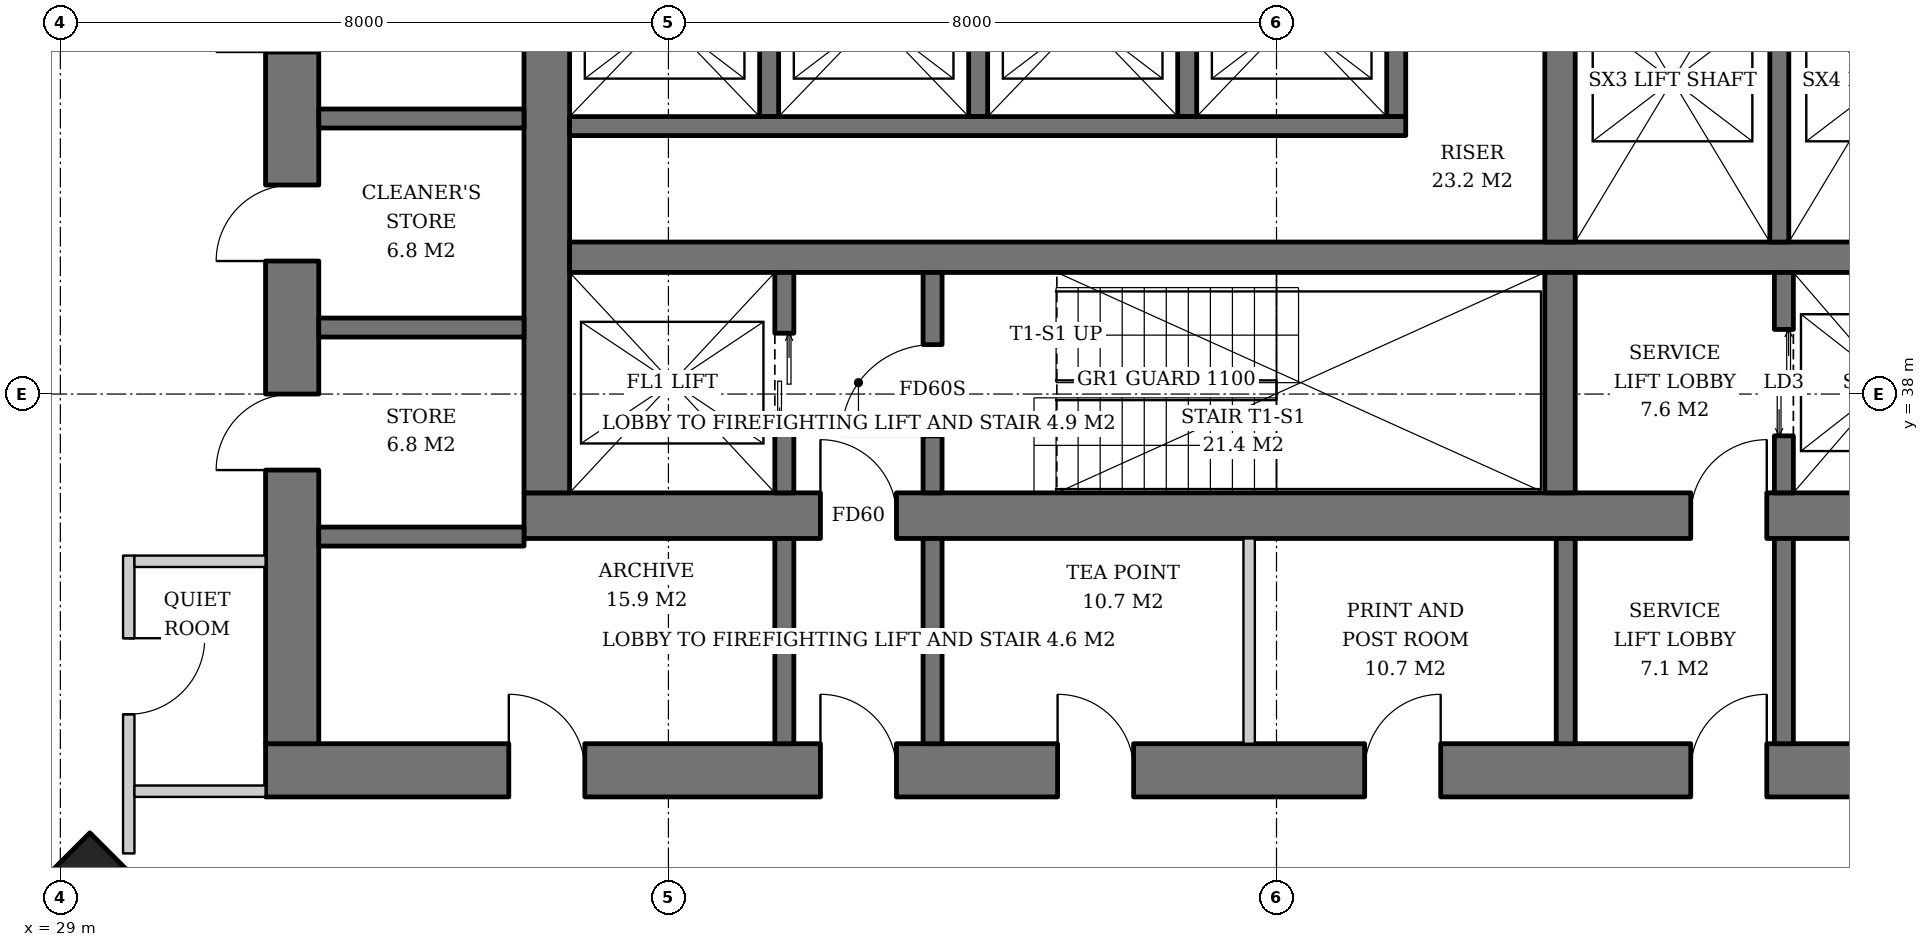
"""IFC4 building model, lengths in metres.
Left out: names, types, materials, properties, quantities, classifications, styles, units other than length and angle.
Written with IfcOpenShell. Run it as: python <this file> out.ifc"""

import sys

from ifc_helpers import new_model, si_unit, direction, frame, frame_2d, origin, origin_2d, place, context, subcontext, project, spatial, rectangle, extrude, element, fill, save


model = new_model("IFC4")
c1 = context("Model", 3, precision=1e-05, world=origin(), true_north=direction((0.0, 1.0)))
c2 = subcontext(c1, "Body", "Model", "MODEL_VIEW")
j1 = project(units=[si_unit("LENGTHUNIT", "METRE"), si_unit("PLANEANGLEUNIT", "RADIAN")], contexts=[c1])
p1 = place(None, origin())
s1 = spatial("IfcSite", under=j1, at=p1, CompositionType="ELEMENT")
p2 = place(p1, origin())
s2 = spatial("IfcBuilding", under=s1, at=p2, CompositionType="ELEMENT")
p3 = place(p2, frame((0.0, 0.0, 154.0)))
s3 = spatial("IfcBuildingStorey", under=s2, at=p3, CompositionType="ELEMENT", Elevation=154.0)
p4 = place(p3, frame((29.35, 30.35, 0.0), z_axis=(0.031898107953, 0.031898107953, 0.998981992539), x_axis=(-0.707106781187, 0.707106781187, 0.0)))
e1 = element("IfcColumn", 1, at=p4, inside=s3, PredefinedType="COLUMN", context=c2, shape_type="SweptSolid", body=[
    extrude(rectangle(XDim=2.6, YDim=2.6, at=origin_2d()), origin(), (0.0, 0.0, 1.0), 3.804),
])
p5 = place(p3, frame((35.1, 36.4, 0.0), z_axis=(0.0, 0.0, 1.0), x_axis=(1.0, 0.0, 0.0)))
e2 = element("IfcWall", 2, at=p5, inside=s3, PredefinedType="SHEAR", context=c2, shape_type="SweptSolid", body=[
    extrude(rectangle(XDim=19.8, YDim=0.6, at=frame_2d((9.9, 0.0))), origin(), (0.0, 0.0, 1.0), 3.8),
])
p6 = place(p5, frame((3.9, 0.0, 0.0)))
e3 = element("IfcOpeningElement", 3, at=p6, cuts=e2, PredefinedType="OPENING", context=c2, shape_type="SweptSolid", body=[
    extrude(rectangle(XDim=1.0, YDim=2.1, at=frame_2d((0.5, 1.05))), frame((0.0, 0.31, 0.0), z_axis=(0.0, -1.0, 0.0), x_axis=(1.0, 0.0, 0.0)), (0.0, 0.0, 1.0), 0.62),
])
p7 = place(p5, frame((15.35, 0.0, 0.0)))
e4 = element("IfcOpeningElement", 4, at=p7, cuts=e2, PredefinedType="OPENING", context=c2, shape_type="SweptSolid", body=[
    extrude(rectangle(XDim=1.0, YDim=2.1, at=frame_2d((0.5, 1.05))), frame((0.0, 0.31, 0.0), z_axis=(0.0, -1.0, 0.0), x_axis=(1.0, 0.0, 0.0)), (0.0, 0.0, 1.0), 0.62),
])
p8 = place(p3, frame((35.4, 36.7, 0.0), z_axis=(0.0, 0.0, 1.0), x_axis=(0.0, 1.0, 0.0)))
e5 = element("IfcWall", 5, at=p8, inside=s3, PredefinedType="SHEAR", context=c2, shape_type="SweptSolid", body=[
    extrude(rectangle(XDim=18.6, YDim=0.6, at=frame_2d((9.3, 0.0))), origin(), (0.0, 0.0, 1.0), 3.8),
])
p9 = place(p8, frame((8.4, 0.0, 0.0)))
e6 = element("IfcOpeningElement", 6, at=p9, cuts=e5, PredefinedType="OPENING", context=c2, shape_type="SweptSolid", body=[
    extrude(rectangle(XDim=1.8, YDim=2.4, at=frame_2d((0.9, 1.2))), frame((0.0, 0.31, 0.0), z_axis=(0.0, -1.0, 0.0), x_axis=(1.0, 0.0, 0.0)), (0.0, 0.0, 1.0), 0.62),
])
p10 = place(p3, frame((31.7, 33.05, 0.0), z_axis=(0.0, 0.0, 1.0), x_axis=(1.0, 0.0, 0.0)))
e7 = element("IfcWall", 7, at=p10, inside=s3, PredefinedType="SHEAR", context=c2, shape_type="SweptSolid", body=[
    extrude(rectangle(XDim=26.6, YDim=0.7, at=frame_2d((13.3, 0.0))), origin(), (0.0, 0.0, 1.0), 3.8),
])
p11 = place(p10, frame((7.3, 0.0, 0.0)))
e8 = element("IfcOpeningElement", 8, at=p11, cuts=e7, PredefinedType="OPENING", context=c2, shape_type="SweptSolid", body=[
    extrude(rectangle(XDim=1.0, YDim=2.1, at=frame_2d((0.5, 1.05))), frame((0.0, 0.36, 0.0), z_axis=(0.0, -1.0, 0.0), x_axis=(1.0, 0.0, 0.0)), (0.0, 0.0, 1.0), 0.72),
])
p12 = place(p10, frame((18.75, 0.0, 0.0)))
e9 = element("IfcOpeningElement", 9, at=p12, cuts=e7, PredefinedType="OPENING", context=c2, shape_type="SweptSolid", body=[
    extrude(rectangle(XDim=1.0, YDim=2.1, at=frame_2d((0.5, 1.05))), frame((0.0, 0.36, 0.0), z_axis=(0.0, -1.0, 0.0), x_axis=(1.0, 0.0, 0.0)), (0.0, 0.0, 1.0), 0.72),
])
p13 = place(p10, frame((3.2, 0.0, 0.0)))
e10 = element("IfcOpeningElement", 10, at=p13, cuts=e7, PredefinedType="OPENING", context=c2, shape_type="SweptSolid", body=[
    extrude(rectangle(XDim=1.0, YDim=2.1, at=frame_2d((0.5, 1.05))), frame((0.0, 0.36, 0.0), z_axis=(0.0, -1.0, 0.0), x_axis=(1.0, 0.0, 0.0)), (0.0, 0.0, 1.0), 0.72),
])
p14 = place(p10, frame((10.42, 0.0, 0.0)))
e11 = element("IfcOpeningElement", 11, at=p14, cuts=e7, PredefinedType="OPENING", context=c2, shape_type="SweptSolid", body=[
    extrude(rectangle(XDim=1.0, YDim=2.1, at=frame_2d((0.5, 1.05))), frame((0.0, 0.36, 0.0), z_axis=(0.0, -1.0, 0.0), x_axis=(1.0, 0.0, 0.0)), (0.0, 0.0, 1.0), 0.72),
])
p15 = place(p10, frame((14.46, 0.0, 0.0)))
e12 = element("IfcOpeningElement", 12, at=p15, cuts=e7, PredefinedType="OPENING", context=c2, shape_type="SweptSolid", body=[
    extrude(rectangle(XDim=1.0, YDim=2.1, at=frame_2d((0.5, 1.05))), frame((0.0, 0.36, 0.0), z_axis=(0.0, -1.0, 0.0), x_axis=(1.0, 0.0, 0.0)), (0.0, 0.0, 1.0), 0.72),
])
p16 = place(p10, frame((22.5, 0.0, 0.0)))
e13 = element("IfcOpeningElement", 13, at=p16, cuts=e7, PredefinedType="OPENING", context=c2, shape_type="SweptSolid", body=[
    extrude(rectangle(XDim=1.0, YDim=2.1, at=frame_2d((0.5, 1.05))), frame((0.0, 0.36, 0.0), z_axis=(0.0, -1.0, 0.0), x_axis=(1.0, 0.0, 0.0)), (0.0, 0.0, 1.0), 0.72),
])
p17 = place(p3, frame((32.05, 33.4, 0.0), z_axis=(0.0, 0.0, 1.0), x_axis=(0.0, 1.0, 0.0)))
e14 = element("IfcWall", 14, at=p17, inside=s3, PredefinedType="SHEAR", context=c2, shape_type="SweptSolid", body=[
    extrude(rectangle(XDim=25.2, YDim=0.7, at=frame_2d((12.6, 0.0))), origin(), (0.0, 0.0, 1.0), 3.8),
])
p18 = place(p17, frame((11.7, 0.0, 0.0)))
e15 = element("IfcOpeningElement", 15, at=p18, cuts=e14, PredefinedType="OPENING", context=c2, shape_type="SweptSolid", body=[
    extrude(rectangle(XDim=1.8, YDim=2.4, at=frame_2d((0.9, 1.2))), frame((0.0, 0.36, 0.0), z_axis=(0.0, -1.0, 0.0), x_axis=(1.0, 0.0, 0.0)), (0.0, 0.0, 1.0), 0.72),
])
p19 = place(p17, frame((3.6, 0.0, 0.0)))
e16 = element("IfcOpeningElement", 16, at=p19, cuts=e14, PredefinedType="OPENING", context=c2, shape_type="SweptSolid", body=[
    extrude(rectangle(XDim=1.0, YDim=2.1, at=frame_2d((0.5, 1.05))), frame((0.0, 0.36, 0.0), z_axis=(0.0, -1.0, 0.0), x_axis=(1.0, 0.0, 0.0)), (0.0, 0.0, 1.0), 0.72),
])
p20 = place(p17, frame((6.35, 0.0, 0.0)))
e17 = element("IfcOpeningElement", 17, at=p20, cuts=e14, PredefinedType="OPENING", context=c2, shape_type="SweptSolid", body=[
    extrude(rectangle(XDim=1.0, YDim=2.1, at=frame_2d((0.5, 1.05))), frame((0.0, 0.36, 0.0), z_axis=(0.0, -1.0, 0.0), x_axis=(1.0, 0.0, 0.0)), (0.0, 0.0, 1.0), 0.72),
])
p21 = place(p17, frame((9.1, 0.0, 0.0)))
e18 = element("IfcOpeningElement", 18, at=p21, cuts=e14, PredefinedType="OPENING", context=c2, shape_type="SweptSolid", body=[
    extrude(rectangle(XDim=1.0, YDim=2.1, at=frame_2d((0.5, 1.05))), frame((0.0, 0.36, 0.0), z_axis=(0.0, -1.0, 0.0), x_axis=(1.0, 0.0, 0.0)), (0.0, 0.0, 1.0), 0.72),
])
p22 = place(p17, frame((15.1, 0.0, 0.0)))
e19 = element("IfcOpeningElement", 19, at=p22, cuts=e14, PredefinedType="OPENING", context=c2, shape_type="SweptSolid", body=[
    extrude(rectangle(XDim=1.0, YDim=2.1, at=frame_2d((0.5, 1.05))), frame((0.0, 0.36, 0.0), z_axis=(0.0, -1.0, 0.0), x_axis=(1.0, 0.0, 0.0)), (0.0, 0.0, 1.0), 0.72),
])
p23 = place(p17, frame((17.85, 0.0, 0.0)))
e20 = element("IfcOpeningElement", 20, at=p23, cuts=e14, PredefinedType="OPENING", context=c2, shape_type="SweptSolid", body=[
    extrude(rectangle(XDim=1.0, YDim=2.1, at=frame_2d((0.5, 1.05))), frame((0.0, 0.36, 0.0), z_axis=(0.0, -1.0, 0.0), x_axis=(1.0, 0.0, 0.0)), (0.0, 0.0, 1.0), 0.72),
])
p24 = place(p3, frame((35.7, 39.8, 0.0), z_axis=(0.0, 0.0, 1.0), x_axis=(1.0, 0.0, 0.0)))
e21 = element("IfcWall", 21, at=p24, inside=s3, PredefinedType="SHEAR", context=c2, shape_type="SweptSolid", body=[
    extrude(rectangle(XDim=18.6, YDim=0.4, at=frame_2d((9.3, 0.0))), origin(), (0.0, 0.0, 1.0), 3.8),
])
p25 = place(p3, frame((48.73, 36.7, 0.0), z_axis=(0.0, 0.0, 1.0), x_axis=(0.0, 1.0, 0.0)))
e22 = element("IfcWall", 22, at=p25, inside=s3, PredefinedType="SHEAR", context=c2, shape_type="SweptSolid", body=[
    extrude(rectangle(XDim=2.9, YDim=0.4, at=frame_2d((1.45, 0.0))), origin(), (0.0, 0.0, 1.0), 3.8),
])
p26 = place(p3, frame((48.73, 40.0, 0.0), z_axis=(0.0, 0.0, 1.0), x_axis=(0.0, 1.0, 0.0)))
e23 = element("IfcWall", 23, at=p26, inside=s3, PredefinedType="SHEAR", context=c2, shape_type="SweptSolid", body=[
    extrude(rectangle(XDim=12.0, YDim=0.4, at=frame_2d((6.0, 0.0))), origin(), (0.0, 0.0, 1.0), 3.8),
])
p27 = place(p3, frame((38.525, 36.7, 0.0), z_axis=(0.0, 0.0, 1.0), x_axis=(0.0, 1.0, 0.0)))
e24 = element("IfcWall", 24, at=p27, inside=s3, PredefinedType="SHEAR", context=c2, shape_type="SweptSolid", body=[
    extrude(rectangle(XDim=2.9, YDim=0.25, at=frame_2d((1.45, 0.0))), origin(), (0.0, 0.0, 1.0), 3.8),
])
p28 = place(p27, frame((0.8, 0.0, 0.0)))
e25 = element("IfcOpeningElement", 25, at=p28, cuts=e24, PredefinedType="OPENING", context=c2, shape_type="SweptSolid", body=[
    extrude(rectangle(XDim=1.3, YDim=2.2, at=frame_2d((0.65, 1.1))), frame((0.0, 0.135, 0.0), z_axis=(0.0, -1.0, 0.0), x_axis=(1.0, 0.0, 0.0)), (0.0, 0.0, 1.0), 0.27),
])
p29 = place(p3, frame((40.475, 36.7, 0.0), z_axis=(0.0, 0.0, 1.0), x_axis=(0.0, 1.0, 0.0)))
e26 = element("IfcWall", 26, at=p29, inside=s3, PredefinedType="SHEAR", context=c2, shape_type="SweptSolid", body=[
    extrude(rectangle(XDim=2.9, YDim=0.25, at=frame_2d((1.45, 0.0))), origin(), (0.0, 0.0, 1.0), 3.8),
])
p30 = place(p29, frame((0.75, 0.0, 0.0)))
e27 = element("IfcOpeningElement", 27, at=p30, cuts=e26, PredefinedType="OPENING", context=c2, shape_type="SweptSolid", body=[
    extrude(rectangle(XDim=1.2, YDim=2.1, at=frame_2d((0.6, 1.05))), frame((0.0, 0.135, 0.0), z_axis=(0.0, -1.0, 0.0), x_axis=(1.0, 0.0, 0.0)), (0.0, 0.0, 1.0), 0.27),
])
p31 = place(p3, frame((51.675, 36.7, 0.0), z_axis=(0.0, 0.0, 1.0), x_axis=(0.0, 1.0, 0.0)))
e28 = element("IfcWall", 28, at=p31, inside=s3, PredefinedType="SHEAR", context=c2, shape_type="SweptSolid", body=[
    extrude(rectangle(XDim=2.9, YDim=0.25, at=frame_2d((1.45, 0.0))), origin(), (0.0, 0.0, 1.0), 3.8),
])
p32 = place(p31, frame((0.75, 0.0, 0.0)))
e29 = element("IfcOpeningElement", 29, at=p32, cuts=e28, PredefinedType="OPENING", context=c2, shape_type="SweptSolid", body=[
    extrude(rectangle(XDim=1.4, YDim=2.4, at=frame_2d((0.7, 1.2))), frame((0.0, 0.135, 0.0), z_axis=(0.0, -1.0, 0.0), x_axis=(1.0, 0.0, 0.0)), (0.0, 0.0, 1.0), 0.27),
])
for number, where, z_axis, x_axis in (
    (30, (38.325, 44.25, 0.0), (0.0, 0.0, 1.0), (0.0, -1.0, 0.0)),
    (31, (41.075, 44.25, 0.0), (0.0, 0.0, 1.0), (0.0, -1.0, 0.0)),
    (32, (43.825, 44.25, 0.0), (0.0, 0.0, 1.0), (0.0, -1.0, 0.0)),
    (33, (46.575, 44.25, 0.0), (0.0, 0.0, 1.0), (0.0, -1.0, 0.0)),
):
    element("IfcWall", number, at=place(p3, frame(where, z_axis=z_axis, x_axis=x_axis)), inside=s3, PredefinedType="SHEAR", context=c2, shape_type="SweptSolid", body=[
        extrude(rectangle(XDim=2.6, YDim=0.25, at=frame_2d((1.3, 0.0))), origin(), (0.0, 0.0, 1.0), 3.8),
    ])
p33 = place(p3, frame((35.7, 41.525, 0.0), z_axis=(0.0, 0.0, 1.0), x_axis=(1.0, 0.0, 0.0)))
e34 = element("IfcWall", 34, at=p33, inside=s3, PredefinedType="SHEAR", context=c2, shape_type="SweptSolid", body=[
    extrude(rectangle(XDim=11.0, YDim=0.25, at=frame_2d((5.5, 0.0))), origin(), (0.0, 0.0, 1.0), 3.8),
])
p34 = place(p3, frame((51.615, 44.25, 0.0), z_axis=(0.0, 0.0, 1.0), x_axis=(0.0, -1.0, 0.0)))
e35 = element("IfcWall", 35, at=p34, inside=s3, PredefinedType="SHEAR", context=c2, shape_type="SweptSolid", body=[
    extrude(rectangle(XDim=4.25, YDim=0.25, at=frame_2d((2.125, 0.0))), origin(), (0.0, 0.0, 1.0), 3.8),
])
for number, where, z_axis, x_axis in (
    (36, (32.4, 36.125, 0.0), (0.0, 0.0, 1.0), (1.0, 0.0, 0.0)),
    (37, (32.4, 38.875, 0.0), (0.0, 0.0, 1.0), (1.0, 0.0, 0.0)),
    (38, (32.4, 41.625, 0.0), (0.0, 0.0, 1.0), (1.0, 0.0, 0.0)),
):
    element("IfcWall", number, at=place(p3, frame(where, z_axis=z_axis, x_axis=x_axis)), inside=s3, PredefinedType="SHEAR", context=c2, shape_type="SweptSolid", body=[
        extrude(rectangle(XDim=2.7, YDim=0.25, at=frame_2d((1.35, 0.0))), origin(), (0.0, 0.0, 1.0), 3.8),
    ])
for number, where, z_axis, x_axis in (
    (39, (38.525, 33.4, 0.0), (0.0, 0.0, 1.0), (0.0, 1.0, 0.0)),
    (40, (40.475, 33.4, 0.0), (0.0, 0.0, 1.0), (0.0, 1.0, 0.0)),
    (41, (48.805, 33.4, 0.0), (0.0, 0.0, 1.0), (0.0, 1.0, 0.0)),
    (42, (51.675, 33.4, 0.0), (0.0, 0.0, 1.0), (0.0, 1.0, 0.0)),
):
    element("IfcWall", number, at=place(p3, frame(where, z_axis=z_axis, x_axis=x_axis)), inside=s3, PredefinedType="SOLIDWALL", context=c2, shape_type="SweptSolid", body=[
        extrude(rectangle(XDim=2.7, YDim=0.25, at=frame_2d((1.35, 0.0))), origin(), (0.0, 0.0, 1.0), 3.52),
    ])
p35 = place(p3, frame((44.64, 33.4, 0.0), z_axis=(0.0, 0.0, 1.0), x_axis=(0.0, 1.0, 0.0)))
e43 = element("IfcWall", 43, at=p35, inside=s3, PredefinedType="SOLIDWALL", context=c2, shape_type="SweptSolid", body=[
    extrude(rectangle(XDim=2.7, YDim=0.15, at=frame_2d((1.35, 0.0))), origin(), (0.0, 0.0, 1.0), 3.52),
])
p36 = place(p3, frame((29.9, 35.875, 0.0), z_axis=(0.0, 0.0, 1.0), x_axis=(0.0, -1.0, 0.0)))
e44 = element("IfcWall", 44, at=p36, inside=s3, PredefinedType="PARTITIONING", context=c2, shape_type="SweptSolid", body=[
    extrude(rectangle(XDim=3.919, YDim=0.15, at=frame_2d((1.959, 0.0))), origin(), (0.0, 0.0, 1.0), 2.706),
])
p37 = place(p36, frame((1.087, 0.0, 0.0)))
e45 = element("IfcOpeningElement", 45, at=p37, cuts=e44, PredefinedType="OPENING", context=c2, shape_type="SweptSolid", body=[
    extrude(rectangle(XDim=1.0, YDim=2.1, at=frame_2d((0.5, 1.05))), frame((0.0, 0.085, 0.0), z_axis=(0.0, -1.0, 0.0), x_axis=(1.0, 0.0, 0.0)), (0.0, 0.0, 1.0), 0.17),
])
for number, where, z_axis, x_axis in (
    (46, (31.7, 35.8, 0.0), (0.0, 0.0, 1.0), (-1.0, 0.0, 0.0)),
    (47, (31.7, 32.775, 0.0), (0.0, 0.0, 1.0), (-1.0, 0.0, 0.0)),
):
    element("IfcWall", number, at=place(p3, frame(where, z_axis=z_axis, x_axis=x_axis)), inside=s3, PredefinedType="PARTITIONING", context=c2, shape_type="SweptSolid", body=[
        extrude(rectangle(XDim=1.725, YDim=0.15, at=frame_2d((0.862, 0.0))), origin(), (0.0, 0.0, 1.0), 3.52),
    ])
p38 = place(p28, origin())
e48 = element("IfcDoor", 48, at=p38, inside=s3, OperationType="DOUBLE_DOOR_SLIDING", PredefinedType="DOOR", context=c2, shape_type="SweptSolid", body=[
    extrude(rectangle(XDim=1.3, YDim=2.2, at=frame_2d((0.65, 1.1))), frame((0.0, 0.025, 0.0), z_axis=(0.0, -1.0, 0.0), x_axis=(1.0, 0.0, 0.0)), (0.0, 0.0, 1.0), 0.05),
])
fill(e25, e48)
p39 = place(p30, origin())
e49 = element("IfcDoor", 49, at=p39, inside=s3, OperationType="SINGLE_SWING_LEFT", PredefinedType="DOOR", context=c2, shape_type="SweptSolid", body=[
    extrude(rectangle(XDim=1.2, YDim=2.1, at=frame_2d((0.6, 1.05))), frame((0.0, 0.025, 0.0), z_axis=(0.0, -1.0, 0.0), x_axis=(1.0, 0.0, 0.0)), (0.0, 0.0, 1.0), 0.05),
])
fill(e27, e49)
p40 = place(p32, origin())
e50 = element("IfcDoor", 50, at=p40, inside=s3, OperationType="DOUBLE_DOOR_SLIDING", PredefinedType="DOOR", context=c2, shape_type="SweptSolid", body=[
    extrude(rectangle(XDim=1.4, YDim=2.4, at=frame_2d((0.7, 1.2))), frame((0.0, 0.025, 0.0), z_axis=(0.0, -1.0, 0.0), x_axis=(1.0, 0.0, 0.0)), (0.0, 0.0, 1.0), 0.05),
])
fill(e29, e50)
p41 = place(p6, origin())
e51 = element("IfcDoor", 51, at=p41, inside=s3, OperationType="SINGLE_SWING_LEFT", PredefinedType="DOOR", context=c2, shape_type="SweptSolid", body=[
    extrude(rectangle(XDim=1.0, YDim=2.1, at=frame_2d((0.5, 1.05))), frame((0.0, 0.025, 0.0), z_axis=(0.0, -1.0, 0.0), x_axis=(1.0, 0.0, 0.0)), (0.0, 0.0, 1.0), 0.05),
])
fill(e3, e51)
p42 = place(p7, origin())
e52 = element("IfcDoor", 52, at=p42, inside=s3, OperationType="SINGLE_SWING_RIGHT", PredefinedType="DOOR", context=c2, shape_type="SweptSolid", body=[
    extrude(rectangle(XDim=1.0, YDim=2.1, at=frame_2d((0.5, 1.05))), frame((0.0, 0.025, 0.0), z_axis=(0.0, -1.0, 0.0), x_axis=(1.0, 0.0, 0.0)), (0.0, 0.0, 1.0), 0.05),
])
fill(e4, e52)
p43 = place(p11, origin())
e53 = element("IfcDoor", 53, at=p43, inside=s3, OperationType="SINGLE_SWING_LEFT", PredefinedType="DOOR", context=c2, shape_type="SweptSolid", body=[
    extrude(rectangle(XDim=1.0, YDim=2.1, at=frame_2d((0.5, 1.05))), frame((0.0, 0.025, 0.0), z_axis=(0.0, -1.0, 0.0), x_axis=(1.0, 0.0, 0.0)), (0.0, 0.0, 1.0), 0.05),
])
fill(e8, e53)
p44 = place(p12, origin())
e54 = element("IfcDoor", 54, at=p44, inside=s3, OperationType="SINGLE_SWING_RIGHT", PredefinedType="DOOR", context=c2, shape_type="SweptSolid", body=[
    extrude(rectangle(XDim=1.0, YDim=2.1, at=frame_2d((0.5, 1.05))), frame((0.0, 0.025, 0.0), z_axis=(0.0, -1.0, 0.0), x_axis=(1.0, 0.0, 0.0)), (0.0, 0.0, 1.0), 0.05),
])
fill(e9, e54)
p45 = place(p19, origin())
e55 = element("IfcDoor", 55, at=p45, inside=s3, OperationType="SINGLE_SWING_LEFT", PredefinedType="DOOR", context=c2, shape_type="SweptSolid", body=[
    extrude(rectangle(XDim=1.0, YDim=2.1, at=frame_2d((0.5, 1.05))), frame((0.0, -0.29, 0.0), z_axis=(0.0, -1.0, 0.0), x_axis=(1.0, 0.0, 0.0)), (0.0, 0.0, 1.0), 0.05),
])
fill(e16, e55)
p46 = place(p20, origin())
e56 = element("IfcDoor", 56, at=p46, inside=s3, OperationType="SINGLE_SWING_LEFT", PredefinedType="DOOR", context=c2, shape_type="SweptSolid", body=[
    extrude(rectangle(XDim=1.0, YDim=2.1, at=frame_2d((0.5, 1.05))), frame((0.0, -0.29, 0.0), z_axis=(0.0, -1.0, 0.0), x_axis=(1.0, 0.0, 0.0)), (0.0, 0.0, 1.0), 0.05),
])
fill(e17, e56)
p47 = place(p13, origin())
e57 = element("IfcDoor", 57, at=p47, inside=s3, OperationType="SINGLE_SWING_LEFT", PredefinedType="DOOR", context=c2, shape_type="SweptSolid", body=[
    extrude(rectangle(XDim=1.0, YDim=2.1, at=frame_2d((0.5, 1.05))), frame((0.0, 0.34, 0.0), z_axis=(0.0, -1.0, 0.0), x_axis=(1.0, 0.0, 0.0)), (0.0, 0.0, 1.0), 0.05),
])
fill(e10, e57)
p48 = place(p14, origin())
e58 = element("IfcDoor", 58, at=p48, inside=s3, OperationType="SINGLE_SWING_LEFT", PredefinedType="DOOR", context=c2, shape_type="SweptSolid", body=[
    extrude(rectangle(XDim=1.0, YDim=2.1, at=frame_2d((0.5, 1.05))), frame((0.0, 0.34, 0.0), z_axis=(0.0, -1.0, 0.0), x_axis=(1.0, 0.0, 0.0)), (0.0, 0.0, 1.0), 0.05),
])
fill(e11, e58)
p49 = place(p15, origin())
e59 = element("IfcDoor", 59, at=p49, inside=s3, OperationType="SINGLE_SWING_RIGHT", PredefinedType="DOOR", context=c2, shape_type="SweptSolid", body=[
    extrude(rectangle(XDim=1.0, YDim=2.1, at=frame_2d((0.5, 1.05))), frame((0.0, 0.34, 0.0), z_axis=(0.0, -1.0, 0.0), x_axis=(1.0, 0.0, 0.0)), (0.0, 0.0, 1.0), 0.05),
])
fill(e12, e59)
p50 = place(p37, origin())
e60 = element("IfcDoor", 60, at=p50, inside=s3, OperationType="SINGLE_SWING_LEFT", PredefinedType="DOOR", context=c2, shape_type="SweptSolid", body=[
    extrude(rectangle(XDim=1.0, YDim=2.1, at=frame_2d((0.5, 1.05))), frame((0.0, 0.025, 0.0), z_axis=(0.0, -1.0, 0.0), x_axis=(1.0, 0.0, 0.0)), (0.0, 0.0, 1.0), 0.05),
])
fill(e45, e60)
save(model, sys.argv[1])
